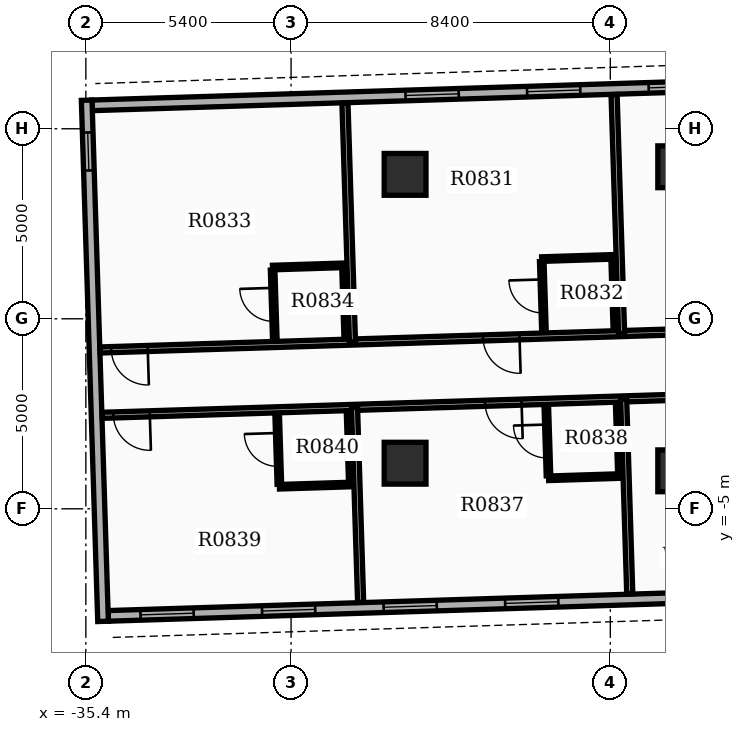
"""IFC4 building model, lengths in metres.
Left out: names, types, materials, properties, quantities, classifications, styles, units other than length and angle.
Written with IfcOpenShell. Run it as: python <this file> out.ifc"""

import sys

from ifc_helpers import new_model, si_unit, direction, frame, frame_2d, origin, origin_2d, place, context, subcontext, project, spatial, rectangle, extrude, element, fill, save


model = new_model("IFC4")
c1 = context("Model", 3, precision=1e-05, world=origin(), true_north=direction((0.0, 1.0)))
c2 = subcontext(c1, "Body", "Model", "MODEL_VIEW")
j1 = project(units=[si_unit("LENGTHUNIT", "METRE"), si_unit("PLANEANGLEUNIT", "RADIAN")], contexts=[c1])
p1 = place(None, origin())
s1 = spatial("IfcSite", under=j1, at=p1, CompositionType="ELEMENT")
p2 = place(p1, origin())
s2 = spatial("IfcBuilding", under=s1, at=p2, CompositionType="ELEMENT")
p3 = place(p2, frame((0.0, 0.0, 56.1)))
s3 = spatial("IfcBuildingStorey", under=s2, at=p3, CompositionType="ELEMENT", Elevation=56.1)
for number, where, z_axis, x_axis in (
    (1, (-19.8, -4.0, 0.0), (0.0, 0.0, 1.0), (1.0, 0.0, 0.0)),
    (2, (-19.8, 4.0, 0.0), (0.0, 0.0, 1.0), (1.0, 0.0, 0.0)),
    (3, (-27.0, -3.8, 0.0), (0.0, 0.0, 1.0), (1.0, 0.0, 0.0)),
    (4, (-27.0, 3.8, 0.0), (0.0, 0.0, 1.0), (1.0, 0.0, 0.0)),
):
    element("IfcColumn", number, at=place(p3, frame(where, z_axis=z_axis, x_axis=x_axis)), inside=s3, PredefinedType="COLUMN", context=c2, shape_type="SweptSolid", body=[
        extrude(rectangle(XDim=1.1, YDim=1.1, at=origin_2d()), origin(), (0.0, 0.0, 1.0), 3.9),
    ])
p4 = place(p3, frame((-15.144, 6.247, 0.0), z_axis=(0.0, 0.0, 1.0), x_axis=(-0.999506955354, -0.031398187845, 0.0)))
e5 = element("IfcWall", 5, at=p4, inside=s3, PredefinedType="STANDARD", context=c2, shape_type="SweptSolid", body=[
    extrude(rectangle(XDim=20.1, YDim=0.28, at=frame_2d((10.05, 0.0))), origin(), (0.0, 0.0, 1.0), 2.91),
])
p5 = place(p4, frame((0.85, 0.0, 0.8)))
e6 = element("IfcOpeningElement", 6, at=p5, cuts=e5, PredefinedType="OPENING", context=c2, shape_type="SweptSolid", body=[
    extrude(rectangle(XDim=1.4, YDim=1.6, at=frame_2d((0.7, 0.8))), frame((0.0, 0.15, 0.0), z_axis=(0.0, -1.0, 0.0), x_axis=(1.0, 0.0, 0.0)), (0.0, 0.0, 1.0), 0.3),
])
p6 = place(p4, frame((4.05, 0.0, 0.8)))
e7 = element("IfcOpeningElement", 7, at=p6, cuts=e5, PredefinedType="OPENING", context=c2, shape_type="SweptSolid", body=[
    extrude(rectangle(XDim=1.4, YDim=1.6, at=frame_2d((0.7, 0.8))), frame((0.0, 0.15, 0.0), z_axis=(0.0, -1.0, 0.0), x_axis=(1.0, 0.0, 0.0)), (0.0, 0.0, 1.0), 0.3),
])
p7 = place(p4, frame((7.25, 0.0, 0.8)))
e8 = element("IfcOpeningElement", 8, at=p7, cuts=e5, PredefinedType="OPENING", context=c2, shape_type="SweptSolid", body=[
    extrude(rectangle(XDim=1.4, YDim=1.6, at=frame_2d((0.7, 0.8))), frame((0.0, 0.15, 0.0), z_axis=(0.0, -1.0, 0.0), x_axis=(1.0, 0.0, 0.0)), (0.0, 0.0, 1.0), 0.3),
])
p8 = place(p4, frame((10.45, 0.0, 0.8)))
e9 = element("IfcOpeningElement", 9, at=p8, cuts=e5, PredefinedType="OPENING", context=c2, shape_type="SweptSolid", body=[
    extrude(rectangle(XDim=1.4, YDim=1.6, at=frame_2d((0.7, 0.8))), frame((0.0, 0.15, 0.0), z_axis=(0.0, -1.0, 0.0), x_axis=(1.0, 0.0, 0.0)), (0.0, 0.0, 1.0), 0.3),
])
p9 = place(p3, frame((-34.812, -7.817, 0.0), z_axis=(0.0, 0.0, 1.0), x_axis=(0.999506574096, 0.031410322165, 0.0)))
e10 = element("IfcWall", 10, at=p9, inside=s3, PredefinedType="STANDARD", context=c2, shape_type="SweptSolid", body=[
    extrude(rectangle(XDim=20.1, YDim=0.28, at=frame_2d((10.05, 0.0))), origin(), (0.0, 0.0, 1.0), 2.91),
])
p10 = place(p9, frame((0.85, 0.0, 0.8)))
e11 = element("IfcOpeningElement", 11, at=p10, cuts=e10, PredefinedType="OPENING", context=c2, shape_type="SweptSolid", body=[
    extrude(rectangle(XDim=1.4, YDim=1.6, at=frame_2d((0.7, 0.8))), frame((0.0, 0.15, 0.0), z_axis=(0.0, -1.0, 0.0), x_axis=(1.0, 0.0, 0.0)), (0.0, 0.0, 1.0), 0.3),
])
p11 = place(p9, frame((4.05, 0.0, 0.8)))
e12 = element("IfcOpeningElement", 12, at=p11, cuts=e10, PredefinedType="OPENING", context=c2, shape_type="SweptSolid", body=[
    extrude(rectangle(XDim=1.4, YDim=1.6, at=frame_2d((0.7, 0.8))), frame((0.0, 0.15, 0.0), z_axis=(0.0, -1.0, 0.0), x_axis=(1.0, 0.0, 0.0)), (0.0, 0.0, 1.0), 0.3),
])
p12 = place(p9, frame((7.25, 0.0, 0.8)))
e13 = element("IfcOpeningElement", 13, at=p12, cuts=e10, PredefinedType="OPENING", context=c2, shape_type="SweptSolid", body=[
    extrude(rectangle(XDim=1.4, YDim=1.6, at=frame_2d((0.7, 0.8))), frame((0.0, 0.15, 0.0), z_axis=(0.0, -1.0, 0.0), x_axis=(1.0, 0.0, 0.0)), (0.0, 0.0, 1.0), 0.3),
])
p13 = place(p9, frame((10.45, 0.0, 0.8)))
e14 = element("IfcOpeningElement", 14, at=p13, cuts=e10, PredefinedType="OPENING", context=c2, shape_type="SweptSolid", body=[
    extrude(rectangle(XDim=1.4, YDim=1.6, at=frame_2d((0.7, 0.8))), frame((0.0, 0.15, 0.0), z_axis=(0.0, -1.0, 0.0), x_axis=(1.0, 0.0, 0.0)), (0.0, 0.0, 1.0), 0.3),
])
p14 = place(p9, frame((15.0, 0.0, 0.0)))
e15 = element("IfcOpeningElement", 15, at=p14, cuts=e10, PredefinedType="OPENING", context=c2, shape_type="SweptSolid", body=[
    extrude(rectangle(XDim=0.96, YDim=2.1, at=frame_2d((0.48, 1.05))), frame((0.0, 0.15, 0.0), z_axis=(0.0, -1.0, 0.0), x_axis=(1.0, 0.0, 0.0)), (0.0, 0.0, 1.0), 0.3),
])
p15 = place(p3, frame((-35.378, 5.752, 0.0), z_axis=(0.0, 0.0, 1.0), x_axis=(0.031406966164, -0.999506679556, 0.0)))
e16 = element("IfcWall", 16, at=p15, inside=s3, PredefinedType="STANDARD", context=c2, shape_type="SweptSolid", body=[
    extrude(rectangle(XDim=13.72, YDim=0.28, at=frame_2d((6.86, 0.0))), origin(), (0.0, 0.0, 1.0), 2.91),
])
p16 = place(p15, frame((0.85, 0.0, 0.85)))
e17 = element("IfcOpeningElement", 17, at=p16, cuts=e16, PredefinedType="OPENING", context=c2, shape_type="SweptSolid", body=[
    extrude(rectangle(XDim=1.0, YDim=1.5, at=frame_2d((0.5, 0.75))), frame((0.0, 0.15, 0.0), z_axis=(0.0, -1.0, 0.0), x_axis=(1.0, 0.0, 0.0)), (0.0, 0.0, 1.0), 0.3),
])
p17 = place(p3, frame((-14.852, -0.187, 0.0), z_axis=(0.0, 0.0, 1.0), x_axis=(-0.99950639469, -0.031416030536, 0.0)))
e18 = element("IfcWall", 18, at=p17, inside=s3, PredefinedType="PARTITIONING", context=c2, shape_type="SweptSolid", body=[
    extrude(rectangle(XDim=20.182, YDim=0.16, at=frame_2d((10.091, 0.0))), origin(), (0.0, 0.0, 1.0), 2.9),
])
p18 = place(p17, frame((2.626, 0.0, 0.0)))
e19 = element("IfcOpeningElement", 19, at=p18, cuts=e18, PredefinedType="OPENING", context=c2, shape_type="SweptSolid", body=[
    extrude(rectangle(XDim=0.96, YDim=2.15, at=frame_2d((0.48, 1.075))), frame((0.0, 0.09, 0.0), z_axis=(0.0, -1.0, 0.0), x_axis=(1.0, 0.0, 0.0)), (0.0, 0.0, 1.0), 0.18),
])
p19 = place(p17, frame((9.143, 0.0, 0.0)))
e20 = element("IfcOpeningElement", 20, at=p19, cuts=e18, PredefinedType="OPENING", context=c2, shape_type="SweptSolid", body=[
    extrude(rectangle(XDim=0.96, YDim=2.15, at=frame_2d((0.48, 1.075))), frame((0.0, 0.09, 0.0), z_axis=(0.0, -1.0, 0.0), x_axis=(1.0, 0.0, 0.0)), (0.0, 0.0, 1.0), 0.18),
])
p20 = place(p17, frame((18.93, 0.0, 0.0)))
e21 = element("IfcOpeningElement", 21, at=p20, cuts=e18, PredefinedType="OPENING", context=c2, shape_type="SweptSolid", body=[
    extrude(rectangle(XDim=0.96, YDim=2.15, at=frame_2d((0.48, 1.075))), frame((0.0, 0.09, 0.0), z_axis=(0.0, -1.0, 0.0), x_axis=(1.0, 0.0, 0.0)), (0.0, 0.0, 1.0), 0.18),
])
p21 = place(p3, frame((-21.303, -0.389, 0.0), z_axis=(0.0, 0.0, 1.0), x_axis=(-0.031428566013, 0.999506000601, 0.0)))
e22 = element("IfcWall", 22, at=p21, inside=s3, PredefinedType="PARTITIONING", context=c2, shape_type="SweptSolid", body=[
    extrude(rectangle(XDim=6.292, YDim=0.16, at=frame_2d((3.146, 0.0))), origin(), (0.0, 0.0, 1.0), 2.9),
])
p22 = place(p3, frame((-28.385, -0.612, 0.0), z_axis=(0.0, 0.0, 1.0), x_axis=(-0.031429784908, 0.999505962274, 0.0)))
e23 = element("IfcWall", 23, at=p22, inside=s3, PredefinedType="PARTITIONING", context=c2, shape_type="SweptSolid", body=[
    extrude(rectangle(XDim=6.292, YDim=0.16, at=frame_2d((3.146, 0.0))), origin(), (0.0, 0.0, 1.0), 2.9),
])
p23 = place(p3, frame((-23.347, -0.313, 0.0), z_axis=(0.0, 0.0, 1.0), x_axis=(-0.031389704724, 0.999507221803, 0.0)))
e24 = element("IfcWall", 24, at=p23, inside=s3, PredefinedType="PARTITIONING", context=c2, shape_type="SweptSolid", body=[
    extrude(rectangle(XDim=1.82, YDim=0.12, at=frame_2d((0.91, 0.0))), origin(), (0.0, 0.0, 1.0), 2.9),
])
p24 = place(p23, frame((0.47, 0.0, 0.0)))
e25 = element("IfcOpeningElement", 25, at=p24, cuts=e24, PredefinedType="OPENING", context=c2, shape_type="SweptSolid", body=[
    extrude(rectangle(XDim=0.88, YDim=2.1, at=frame_2d((0.44, 1.05))), frame((0.0, 0.07, 0.0), z_axis=(0.0, -1.0, 0.0), x_axis=(1.0, 0.0, 0.0)), (0.0, 0.0, 1.0), 0.14),
])
p25 = place(p3, frame((-21.468, -0.254, 0.0), z_axis=(0.0, 0.0, 1.0), x_axis=(-0.03152371574, 0.999503004171, 0.0)))
e26 = element("IfcWall", 26, at=p25, inside=s3, PredefinedType="PARTITIONING", context=c2, shape_type="SweptSolid", body=[
    extrude(rectangle(XDim=1.82, YDim=0.12, at=frame_2d((0.91, 0.0))), origin(), (0.0, 0.0, 1.0), 2.9),
])
p26 = place(p3, frame((-21.527, 1.63, 0.0), z_axis=(0.0, 0.0, 1.0), x_axis=(-0.999506103526, -0.031425292588, 0.0)))
e27 = element("IfcWall", 27, at=p26, inside=s3, PredefinedType="PARTITIONING", context=c2, shape_type="SweptSolid", body=[
    extrude(rectangle(XDim=1.88, YDim=0.12, at=frame_2d((0.94, 0.0))), origin(), (0.0, 0.0, 1.0), 2.9),
])
p27 = place(p3, frame((-30.428, -0.536, 0.0), z_axis=(0.0, 0.0, 1.0), x_axis=(-0.031389704724, 0.999507221803, 0.0)))
e28 = element("IfcWall", 28, at=p27, inside=s3, PredefinedType="PARTITIONING", context=c2, shape_type="SweptSolid", body=[
    extrude(rectangle(XDim=1.82, YDim=0.12, at=frame_2d((0.91, 0.0))), origin(), (0.0, 0.0, 1.0), 2.9),
])
p28 = place(p27, frame((0.47, 0.0, 0.0)))
e29 = element("IfcOpeningElement", 29, at=p28, cuts=e28, PredefinedType="OPENING", context=c2, shape_type="SweptSolid", body=[
    extrude(rectangle(XDim=0.88, YDim=2.1, at=frame_2d((0.44, 1.05))), frame((0.0, 0.07, 0.0), z_axis=(0.0, -1.0, 0.0), x_axis=(1.0, 0.0, 0.0)), (0.0, 0.0, 1.0), 0.14),
])
p29 = place(p3, frame((-28.549, -0.477, 0.0), z_axis=(0.0, 0.0, 1.0), x_axis=(-0.031389704724, 0.999507221803, 0.0)))
e30 = element("IfcWall", 30, at=p29, inside=s3, PredefinedType="PARTITIONING", context=c2, shape_type="SweptSolid", body=[
    extrude(rectangle(XDim=1.82, YDim=0.12, at=frame_2d((0.91, 0.0))), origin(), (0.0, 0.0, 1.0), 2.9),
])
p30 = place(p3, frame((-28.608, 1.407, 0.0), z_axis=(0.0, 0.0, 1.0), x_axis=(-0.999505975261, -0.031429371883, 0.0)))
e31 = element("IfcWall", 31, at=p30, inside=s3, PredefinedType="PARTITIONING", context=c2, shape_type="SweptSolid", body=[
    extrude(rectangle(XDim=1.88, YDim=0.12, at=frame_2d((0.94, 0.0))), origin(), (0.0, 0.0, 1.0), 2.9),
])
p31 = place(p3, frame((-14.797, -1.906, 0.0), z_axis=(0.0, 0.0, 1.0), x_axis=(-0.999506406629, -0.031415650687, 0.0)))
e32 = element("IfcWall", 32, at=p31, inside=s3, PredefinedType="PARTITIONING", context=c2, shape_type="SweptSolid", body=[
    extrude(rectangle(XDim=20.182, YDim=0.16, at=frame_2d((10.091, 0.0))), origin(), (0.0, 0.0, 1.0), 2.9),
])
p32 = place(p31, frame((2.626, 0.0, 0.0)))
e33 = element("IfcOpeningElement", 33, at=p32, cuts=e32, PredefinedType="OPENING", context=c2, shape_type="SweptSolid", body=[
    extrude(rectangle(XDim=0.96, YDim=2.15, at=frame_2d((0.48, 1.075))), frame((0.0, 0.09, 0.0), z_axis=(0.0, -1.0, 0.0), x_axis=(1.0, 0.0, 0.0)), (0.0, 0.0, 1.0), 0.18),
])
p33 = place(p31, frame((9.143, 0.0, 0.0)))
e34 = element("IfcOpeningElement", 34, at=p33, cuts=e32, PredefinedType="OPENING", context=c2, shape_type="SweptSolid", body=[
    extrude(rectangle(XDim=0.96, YDim=2.15, at=frame_2d((0.48, 1.075))), frame((0.0, 0.09, 0.0), z_axis=(0.0, -1.0, 0.0), x_axis=(1.0, 0.0, 0.0)), (0.0, 0.0, 1.0), 0.18),
])
p34 = place(p31, frame((18.93, 0.0, 0.0)))
e35 = element("IfcOpeningElement", 35, at=p34, cuts=e32, PredefinedType="OPENING", context=c2, shape_type="SweptSolid", body=[
    extrude(rectangle(XDim=0.96, YDim=2.15, at=frame_2d((0.48, 1.075))), frame((0.0, 0.09, 0.0), z_axis=(0.0, -1.0, 0.0), x_axis=(1.0, 0.0, 0.0)), (0.0, 0.0, 1.0), 0.18),
])
p35 = place(p3, frame((-21.249, -2.108, 0.0), z_axis=(0.0, 0.0, 1.0), x_axis=(0.031444155076, -0.999505510296, 0.0)))
e36 = element("IfcWall", 36, at=p35, inside=s3, PredefinedType="PARTITIONING", context=c2, shape_type="SweptSolid", body=[
    extrude(rectangle(XDim=5.132, YDim=0.16, at=frame_2d((2.566, 0.0))), origin(), (0.0, 0.0, 1.0), 2.9),
])
p36 = place(p3, frame((-28.331, -2.331, 0.0), z_axis=(0.0, 0.0, 1.0), x_axis=(0.031445650224, -0.999505463258, 0.0)))
e37 = element("IfcWall", 37, at=p36, inside=s3, PredefinedType="PARTITIONING", context=c2, shape_type="SweptSolid", body=[
    extrude(rectangle(XDim=5.132, YDim=0.16, at=frame_2d((2.566, 0.0))), origin(), (0.0, 0.0, 1.0), 2.9),
])
p37 = place(p3, frame((-23.227, -4.132, 0.0), z_axis=(0.0, 0.0, 1.0), x_axis=(-0.031389704724, 0.999507221803, 0.0)))
e38 = element("IfcWall", 38, at=p37, inside=s3, PredefinedType="PARTITIONING", context=c2, shape_type="SweptSolid", body=[
    extrude(rectangle(XDim=1.82, YDim=0.12, at=frame_2d((0.91, 0.0))), origin(), (0.0, 0.0, 1.0), 2.9),
])
p38 = place(p37, frame((0.47, 0.0, 0.0)))
e39 = element("IfcOpeningElement", 39, at=p38, cuts=e38, PredefinedType="OPENING", context=c2, shape_type="SweptSolid", body=[
    extrude(rectangle(XDim=0.88, YDim=2.1, at=frame_2d((0.44, 1.05))), frame((0.0, 0.07, 0.0), z_axis=(0.0, -1.0, 0.0), x_axis=(1.0, 0.0, 0.0)), (0.0, 0.0, 1.0), 0.14),
])
p39 = place(p3, frame((-21.348, -4.073, 0.0), z_axis=(0.0, 0.0, 1.0), x_axis=(-0.031389704724, 0.999507221803, 0.0)))
e40 = element("IfcWall", 40, at=p39, inside=s3, PredefinedType="PARTITIONING", context=c2, shape_type="SweptSolid", body=[
    extrude(rectangle(XDim=1.82, YDim=0.12, at=frame_2d((0.91, 0.0))), origin(), (0.0, 0.0, 1.0), 2.9),
])
p40 = place(p3, frame((-21.346, -4.137, 0.0), z_axis=(0.0, 0.0, 1.0), x_axis=(-0.999505975261, -0.031429371883, 0.0)))
e41 = element("IfcWall", 41, at=p40, inside=s3, PredefinedType="PARTITIONING", context=c2, shape_type="SweptSolid", body=[
    extrude(rectangle(XDim=1.88, YDim=0.12, at=frame_2d((0.94, 0.0))), origin(), (0.0, 0.0, 1.0), 2.9),
])
p41 = place(p3, frame((-30.308, -4.354, 0.0), z_axis=(0.0, 0.0, 1.0), x_axis=(-0.031519489708, 0.999503137448, 0.0)))
e42 = element("IfcWall", 42, at=p41, inside=s3, PredefinedType="PARTITIONING", context=c2, shape_type="SweptSolid", body=[
    extrude(rectangle(XDim=1.82, YDim=0.12, at=frame_2d((0.91, 0.0))), origin(), (0.0, 0.0, 1.0), 2.9),
])
p42 = place(p41, frame((0.47, 0.0, 0.0)))
e43 = element("IfcOpeningElement", 43, at=p42, cuts=e42, PredefinedType="OPENING", context=c2, shape_type="SweptSolid", body=[
    extrude(rectangle(XDim=0.88, YDim=2.1, at=frame_2d((0.44, 1.05))), frame((0.0, 0.07, 0.0), z_axis=(0.0, -1.0, 0.0), x_axis=(1.0, 0.0, 0.0)), (0.0, 0.0, 1.0), 0.14),
])
p43 = place(p3, frame((-28.429, -4.295, 0.0), z_axis=(0.0, 0.0, 1.0), x_axis=(-0.031389704724, 0.999507221803, 0.0)))
e44 = element("IfcWall", 44, at=p43, inside=s3, PredefinedType="PARTITIONING", context=c2, shape_type="SweptSolid", body=[
    extrude(rectangle(XDim=1.82, YDim=0.12, at=frame_2d((0.91, 0.0))), origin(), (0.0, 0.0, 1.0), 2.9),
])
p44 = place(p3, frame((-28.427, -4.36, 0.0), z_axis=(0.0, 0.0, 1.0), x_axis=(-0.999506103526, -0.031425292588, 0.0)))
e45 = element("IfcWall", 45, at=p44, inside=s3, PredefinedType="PARTITIONING", context=c2, shape_type="SweptSolid", body=[
    extrude(rectangle(XDim=1.88, YDim=0.12, at=frame_2d((0.94, 0.0))), origin(), (0.0, 0.0, 1.0), 2.9),
])
p45 = place(p6, origin())
e46 = element("IfcWindow", 46, at=p45, inside=s3, PartitioningType="SINGLE_PANEL", PredefinedType="WINDOW", context=c2, shape_type="SweptSolid", body=[
    extrude(rectangle(XDim=1.4, YDim=1.6, at=frame_2d((0.7, 0.8))), frame((0.0, 0.03, 0.0), z_axis=(0.0, -1.0, 0.0), x_axis=(1.0, 0.0, 0.0)), (0.0, 0.0, 1.0), 0.06),
])
fill(e7, e46)
p46 = place(p7, origin())
e47 = element("IfcWindow", 47, at=p46, inside=s3, PartitioningType="SINGLE_PANEL", PredefinedType="WINDOW", context=c2, shape_type="SweptSolid", body=[
    extrude(rectangle(XDim=1.4, YDim=1.6, at=frame_2d((0.7, 0.8))), frame((0.0, 0.03, 0.0), z_axis=(0.0, -1.0, 0.0), x_axis=(1.0, 0.0, 0.0)), (0.0, 0.0, 1.0), 0.06),
])
fill(e8, e47)
p47 = place(p8, origin())
e48 = element("IfcWindow", 48, at=p47, inside=s3, PartitioningType="SINGLE_PANEL", PredefinedType="WINDOW", context=c2, shape_type="SweptSolid", body=[
    extrude(rectangle(XDim=1.4, YDim=1.6, at=frame_2d((0.7, 0.8))), frame((0.0, 0.03, 0.0), z_axis=(0.0, -1.0, 0.0), x_axis=(1.0, 0.0, 0.0)), (0.0, 0.0, 1.0), 0.06),
])
fill(e9, e48)
p48 = place(p10, origin())
e49 = element("IfcWindow", 49, at=p48, inside=s3, PartitioningType="SINGLE_PANEL", PredefinedType="WINDOW", context=c2, shape_type="SweptSolid", body=[
    extrude(rectangle(XDim=1.4, YDim=1.6, at=frame_2d((0.7, 0.8))), frame((0.0, 0.03, 0.0), z_axis=(0.0, -1.0, 0.0), x_axis=(1.0, 0.0, 0.0)), (0.0, 0.0, 1.0), 0.06),
])
fill(e11, e49)
p49 = place(p11, origin())
e50 = element("IfcWindow", 50, at=p49, inside=s3, PartitioningType="SINGLE_PANEL", PredefinedType="WINDOW", context=c2, shape_type="SweptSolid", body=[
    extrude(rectangle(XDim=1.4, YDim=1.6, at=frame_2d((0.7, 0.8))), frame((0.0, 0.03, 0.0), z_axis=(0.0, -1.0, 0.0), x_axis=(1.0, 0.0, 0.0)), (0.0, 0.0, 1.0), 0.06),
])
fill(e12, e50)
p50 = place(p12, origin())
e51 = element("IfcWindow", 51, at=p50, inside=s3, PartitioningType="SINGLE_PANEL", PredefinedType="WINDOW", context=c2, shape_type="SweptSolid", body=[
    extrude(rectangle(XDim=1.4, YDim=1.6, at=frame_2d((0.7, 0.8))), frame((0.0, 0.03, 0.0), z_axis=(0.0, -1.0, 0.0), x_axis=(1.0, 0.0, 0.0)), (0.0, 0.0, 1.0), 0.06),
])
fill(e13, e51)
p51 = place(p13, origin())
e52 = element("IfcWindow", 52, at=p51, inside=s3, PartitioningType="SINGLE_PANEL", PredefinedType="WINDOW", context=c2, shape_type="SweptSolid", body=[
    extrude(rectangle(XDim=1.4, YDim=1.6, at=frame_2d((0.7, 0.8))), frame((0.0, 0.03, 0.0), z_axis=(0.0, -1.0, 0.0), x_axis=(1.0, 0.0, 0.0)), (0.0, 0.0, 1.0), 0.06),
])
fill(e14, e52)
p52 = place(p16, origin())
e53 = element("IfcWindow", 53, at=p52, inside=s3, PartitioningType="SINGLE_PANEL", PredefinedType="WINDOW", context=c2, shape_type="SweptSolid", body=[
    extrude(rectangle(XDim=1.0, YDim=1.5, at=frame_2d((0.5, 0.75))), frame((0.0, 0.03, 0.0), z_axis=(0.0, -1.0, 0.0), x_axis=(1.0, 0.0, 0.0)), (0.0, 0.0, 1.0), 0.06),
])
fill(e17, e53)
p53 = place(p19, origin())
e54 = element("IfcDoor", 54, at=p53, inside=s3, OperationType="SINGLE_SWING_LEFT", PredefinedType="DOOR", context=c2, shape_type="SweptSolid", body=[
    extrude(rectangle(XDim=0.96, YDim=2.15, at=frame_2d((0.48, 1.075))), frame((0.0, 0.025, 0.0), z_axis=(0.0, -1.0, 0.0), x_axis=(1.0, 0.0, 0.0)), (0.0, 0.0, 1.0), 0.05),
])
fill(e20, e54)
p54 = place(p24, origin())
e55 = element("IfcDoor", 55, at=p54, inside=s3, OperationType="SINGLE_SWING_RIGHT", PredefinedType="DOOR", context=c2, shape_type="SweptSolid", body=[
    extrude(rectangle(XDim=0.88, YDim=2.1, at=frame_2d((0.44, 1.05))), frame((0.0, 0.025, 0.0), z_axis=(0.0, -1.0, 0.0), x_axis=(1.0, 0.0, 0.0)), (0.0, 0.0, 1.0), 0.05),
])
fill(e25, e55)
p55 = place(p20, origin())
e56 = element("IfcDoor", 56, at=p55, inside=s3, OperationType="SINGLE_SWING_LEFT", PredefinedType="DOOR", context=c2, shape_type="SweptSolid", body=[
    extrude(rectangle(XDim=0.96, YDim=2.15, at=frame_2d((0.48, 1.075))), frame((0.0, 0.025, 0.0), z_axis=(0.0, -1.0, 0.0), x_axis=(1.0, 0.0, 0.0)), (0.0, 0.0, 1.0), 0.05),
])
fill(e21, e56)
p56 = place(p28, origin())
e57 = element("IfcDoor", 57, at=p56, inside=s3, OperationType="SINGLE_SWING_RIGHT", PredefinedType="DOOR", context=c2, shape_type="SweptSolid", body=[
    extrude(rectangle(XDim=0.88, YDim=2.1, at=frame_2d((0.44, 1.05))), frame((0.0, 0.025, 0.0), z_axis=(0.0, -1.0, 0.0), x_axis=(1.0, 0.0, 0.0)), (0.0, 0.0, 1.0), 0.05),
])
fill(e29, e57)
p57 = place(p33, origin())
e58 = element("IfcDoor", 58, at=p57, inside=s3, OperationType="SINGLE_SWING_LEFT", PredefinedType="DOOR", context=c2, shape_type="SweptSolid", body=[
    extrude(rectangle(XDim=0.96, YDim=2.15, at=frame_2d((0.48, 1.075))), frame((0.0, 0.025, 0.0), z_axis=(0.0, -1.0, 0.0), x_axis=(1.0, 0.0, 0.0)), (0.0, 0.0, 1.0), 0.05),
])
fill(e34, e58)
p58 = place(p38, origin())
e59 = element("IfcDoor", 59, at=p58, inside=s3, OperationType="SINGLE_SWING_RIGHT", PredefinedType="DOOR", context=c2, shape_type="SweptSolid", body=[
    extrude(rectangle(XDim=0.88, YDim=2.1, at=frame_2d((0.44, 1.05))), frame((0.0, 0.025, 0.0), z_axis=(0.0, -1.0, 0.0), x_axis=(1.0, 0.0, 0.0)), (0.0, 0.0, 1.0), 0.05),
])
fill(e39, e59)
p59 = place(p34, origin())
e60 = element("IfcDoor", 60, at=p59, inside=s3, OperationType="SINGLE_SWING_LEFT", PredefinedType="DOOR", context=c2, shape_type="SweptSolid", body=[
    extrude(rectangle(XDim=0.96, YDim=2.15, at=frame_2d((0.48, 1.075))), frame((0.0, 0.025, 0.0), z_axis=(0.0, -1.0, 0.0), x_axis=(1.0, 0.0, 0.0)), (0.0, 0.0, 1.0), 0.05),
])
fill(e35, e60)
p60 = place(p42, origin())
e61 = element("IfcDoor", 61, at=p60, inside=s3, OperationType="SINGLE_SWING_RIGHT", PredefinedType="DOOR", context=c2, shape_type="SweptSolid", body=[
    extrude(rectangle(XDim=0.88, YDim=2.1, at=frame_2d((0.44, 1.05))), frame((0.0, 0.025, 0.0), z_axis=(0.0, -1.0, 0.0), x_axis=(1.0, 0.0, 0.0)), (0.0, 0.0, 1.0), 0.05),
])
fill(e43, e61)
save(model, sys.argv[1])
